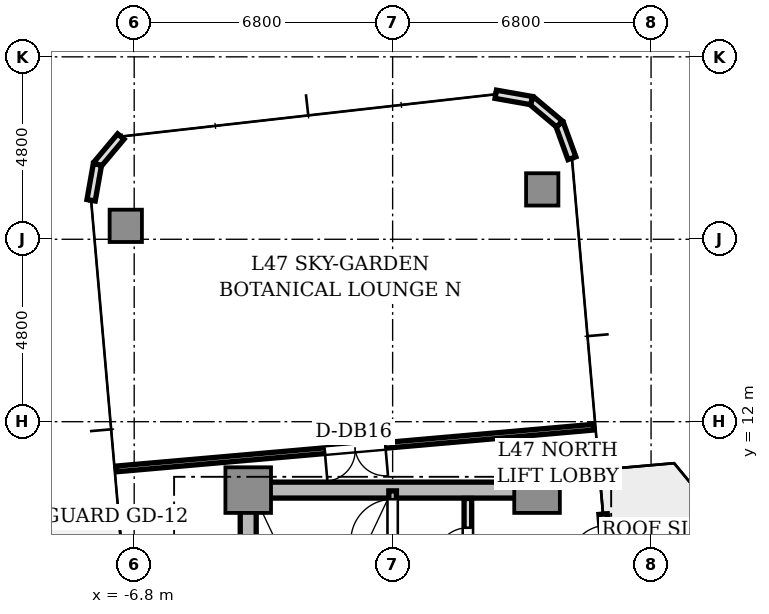
"""IFC4 building model, lengths in metres.
Left out: names, types, materials, properties, quantities, classifications, styles, units other than length and angle.
Written with IfcOpenShell. Run it as: python <this file> out.ifc"""

import sys

from ifc_helpers import new_model, si_unit, direction, frame, frame_2d, origin, origin_2d, place, context, subcontext, project, spatial, rectangle, extrude, source, transform, mapped, element, fill, save


model = new_model("IFC4")
c1 = context("Model", 3, precision=1e-05, world=origin(), true_north=direction((0.0, 1.0)))
c2 = subcontext(c1, "Body", "Model", "MODEL_VIEW")
j1 = project(units=[si_unit("LENGTHUNIT", "METRE"), si_unit("PLANEANGLEUNIT", "RADIAN")], contexts=[c1])
p1 = place(None, origin())
s1 = spatial("IfcSite", under=j1, at=p1, CompositionType="ELEMENT")
p2 = place(p1, origin())
s2 = spatial("IfcBuilding", under=s1, at=p2, CompositionType="ELEMENT")
p3 = place(p2, frame((0.0, 0.0, 170.7)))
s3 = spatial("IfcBuildingStorey", under=s2, at=p3, CompositionType="ELEMENT", Elevation=170.7)
p4 = place(p3, frame((-3.55, 10.2, 0.0), z_axis=(0.0, 0.0, 1.0), x_axis=(1.0, 0.0, 0.0)))
e1 = element("IfcWall", 1, at=p4, inside=s3, PredefinedType="SHEAR", context=c2, shape_type="SweptSolid", body=[
    extrude(rectangle(XDim=7.1, YDim=0.42, at=frame_2d((3.55, 0.0))), origin(), (0.0, 0.0, 1.0), 4.26),
])
p5 = place(p3, frame((-3.8, 2.85, 0.0), z_axis=(0.0, 0.0, 1.0), x_axis=(0.0, 1.0, 0.0)))
e2 = element("IfcWall", 2, at=p5, inside=s3, PredefinedType="SHEAR", context=c2, shape_type="SweptSolid", body=[
    extrude(rectangle(XDim=6.9, YDim=0.42, at=frame_2d((3.45, 0.0))), origin(), (0.0, 0.0, 1.0), 4.26),
])
m1 = source(origin(), c2, "Body", "SweptSolid", [
    extrude(rectangle(XDim=1.2, YDim=1.2, at=origin_2d()), origin(), (0.0, 0.0, 1.0), 4.26),
])
for number, where, z_axis, x_axis in (
    (3, (-3.8, 10.2, 0.0), (0.0, 0.0, 1.0), (1.0, 0.0, 0.0)),
    (4, (3.8, 10.2, 0.0), (0.0, 0.0, 1.0), (1.0, 0.0, 0.0)),
):
    element("IfcColumn", number, at=place(p3, frame(where, z_axis=z_axis, x_axis=x_axis)), inside=s3, PredefinedType="COLUMN", context=c2, shape_type="MappedRepresentation", body=[
        mapped(m1, transform((0.0, 0.0, 0.0), scale=1.0)),
    ])
m2 = source(origin(), c2, "Body", "SweptSolid", [
    extrude(rectangle(XDim=0.85, YDim=0.85, at=origin_2d()), origin(), (0.0, 0.0, 1.0), 4.26),
])
for number, where, z_axis, x_axis in (
    (5, (3.936, 18.112, 0.0), (0.0, 0.0, 1.0), (1.0, 0.0, 0.0)),
    (6, (-7.022, 17.153, 0.0), (0.0, 0.0, 1.0), (1.0, 0.0, 0.0)),
):
    element("IfcColumn", number, at=place(p3, frame(where, z_axis=z_axis, x_axis=x_axis)), inside=s3, PredefinedType="COLUMN", context=c2, shape_type="MappedRepresentation", body=[
        mapped(m2, transform((0.0, 0.0, 0.0), scale=1.0)),
    ])
p6 = place(p3, frame((5.772, 6.879, 0.0), z_axis=(0.0, 0.0, 1.0), x_axis=(-0.087168071984, 0.996193619346, 0.0)))
e7 = element("IfcWall", 7, at=p6, inside=s3, PredefinedType="STANDARD", context=c2, shape_type="SweptSolid", body=[
    extrude(rectangle(XDim=2.7, YDim=0.22, at=frame_2d((1.35, 0.0))), origin(), (0.0, 0.0, 1.0), 4.26),
])
p7 = place(p6, frame((1.4, 0.0, 0.0)))
e8 = element("IfcOpeningElement", 8, at=p7, cuts=e7, PredefinedType="OPENING", context=c2, shape_type="SweptSolid", body=[
    extrude(rectangle(XDim=1.0, YDim=2.2, at=frame_2d((0.5, 1.1))), frame((0.0, 0.12, 0.0), z_axis=(0.0, -1.0, 0.0), x_axis=(1.0, 0.0, 0.0)), (0.0, 0.0, 1.0), 0.24),
])
p8 = place(p3, frame((4.718, 18.933, 0.0), z_axis=(0.0, 0.0, 1.0), x_axis=(-0.34188635151, 0.939741306239, 0.0)))
e9 = element("IfcWall", 9, at=p8, inside=s3, PredefinedType="STANDARD", context=c2, shape_type="SweptSolid", body=[
    extrude(rectangle(XDim=0.958, YDim=0.22, at=frame_2d((0.479, 0.0))), origin(), (0.0, 0.0, 1.0), 4.26),
])
for number, where, z_axis, x_axis in (
    (10, (4.39, 19.833, 0.0), (0.0, 0.0, 1.0), (-0.766, 0.643, 0.0)),
    (11, (3.657, 20.449, 0.0), (0.0, 0.0, 1.0), (-0.985, 0.174, 0.0)),
):
    element("IfcWall", number, at=place(p3, frame(where, z_axis=z_axis, x_axis=x_axis)), inside=s3, PredefinedType="STANDARD", context=c2, shape_type="SweptSolid", body=[
        extrude(rectangle(XDim=0.958, YDim=0.22, at=frame_2d((0.479, 0.0))), origin(), (0.0, 0.0, 1.0), 4.26),
    ])
for number, where, z_axis, x_axis in (
    (12, (-7.152, 19.503, 0.0), (0.0, 0.0, 1.0), (-0.643, -0.766, 0.0)),
    (13, (-7.768, 18.769, 0.0), (0.0, 0.0, 1.0), (-0.174, -0.985, 0.0)),
):
    element("IfcWall", number, at=place(p3, frame(where, z_axis=z_axis, x_axis=x_axis)), inside=s3, PredefinedType="STANDARD", context=c2, shape_type="SweptSolid", body=[
        extrude(rectangle(XDim=0.958, YDim=0.22, at=frame_2d((0.479, 0.0))), origin(), (0.0, 0.0, 1.0), 4.26),
    ])
p9 = place(p3, frame((0.0, 2.5, 0.0), z_axis=(0.0, 0.0, 1.0), x_axis=(0.0, 1.0, 0.0)))
e14 = element("IfcWall", 14, at=p9, inside=s3, PredefinedType="SOLIDWALL", context=c2, shape_type="SweptSolid", body=[
    extrude(rectangle(XDim=7.68, YDim=0.2, at=frame_2d((3.84, 0.0))), origin(), (0.0, 0.0, 1.0), 4.26),
])
p10 = place(p9, frame((6.36, 0.0, 0.0)))
e15 = element("IfcOpeningElement", 15, at=p10, cuts=e14, PredefinedType="OPENING", context=c2, shape_type="SweptSolid", body=[
    extrude(rectangle(XDim=1.1, YDim=2.15, at=frame_2d((0.55, 1.075))), frame((0.0, 0.11, 0.0), z_axis=(0.0, -1.0, 0.0), x_axis=(1.0, 0.0, 0.0)), (0.0, 0.0, 1.0), 0.22),
])
p11 = place(p3, frame((1.98, 5.32, 0.0), z_axis=(0.0, 0.0, 1.0), x_axis=(0.0, 1.0, 0.0)))
e16 = element("IfcWall", 16, at=p11, inside=s3, PredefinedType="SOLIDWALL", context=c2, shape_type="SweptSolid", body=[
    extrude(rectangle(XDim=4.66, YDim=0.2, at=frame_2d((2.33, 0.0))), origin(), (0.0, 0.0, 1.0), 3.81),
])
p12 = place(p11, frame((3.04, 0.0, 0.0)))
e17 = element("IfcOpeningElement", 17, at=p12, cuts=e16, PredefinedType="OPENING", context=c2, shape_type="SweptSolid", body=[
    extrude(rectangle(XDim=0.85, YDim=2.1, at=frame_2d((0.425, 1.05))), frame((0.0, 0.11, 0.0), z_axis=(0.0, -1.0, 0.0), x_axis=(1.0, 0.0, 0.0)), (0.0, 0.0, 1.0), 0.22),
])
p13 = place(p3, frame((5.287, 11.856, 0.0), z_axis=(0.0, 0.0, 1.0), x_axis=(-0.996194790044, -0.087154691724, 0.0)))
e18 = element("IfcWall", 18, at=p13, inside=s3, PredefinedType="PARTITIONING", context=c2, shape_type="SweptSolid", body=[
    extrude(rectangle(XDim=12.6, YDim=0.15, at=frame_2d((6.3, 0.0))), origin(), (0.0, 0.0, 1.0), 3.81),
])
p14 = place(p13, frame((5.5, 0.0, 0.0)))
e19 = element("IfcOpeningElement", 19, at=p14, cuts=e18, PredefinedType="OPENING", context=c2, shape_type="SweptSolid", body=[
    extrude(rectangle(XDim=1.6, YDim=2.25, at=frame_2d((0.8, 1.125))), frame((0.0, 0.085, 0.0), z_axis=(0.0, -1.0, 0.0), x_axis=(1.0, 0.0, 0.0)), (0.0, 0.0, 1.0), 0.17),
])
m3 = source(origin(), c2, "Body", "SweptSolid", [
    extrude(rectangle(XDim=1.0, YDim=0.05, at=origin_2d()), origin(), (0.0, 0.0, 1.0), 2.2),
])
p15 = place(p7, frame((0.5, 0.0, 0.0)))
e20 = element("IfcDoor", 20, at=p15, inside=s3, OperationType="SINGLE_SWING_LEFT", PredefinedType="DOOR", context=c2, shape_type="MappedRepresentation", body=[
    mapped(m3, transform((0.0, 0.0, 0.0), scale=1.0)),
])
fill(e8, e20)
m4 = source(origin(), c2, "Body", "SweptSolid", [
    extrude(rectangle(XDim=1.1, YDim=0.05, at=origin_2d()), origin(), (0.0, 0.0, 1.0), 2.15),
])
p16 = place(p10, frame((0.55, 0.0, 0.0)))
e21 = element("IfcDoor", 21, at=p16, inside=s3, OperationType="SINGLE_SWING_LEFT", PredefinedType="DOOR", context=c2, shape_type="MappedRepresentation", body=[
    mapped(m4, transform((0.0, 0.0, 0.0), scale=1.0)),
])
fill(e15, e21)
m5 = source(origin(), c2, "Body", "SweptSolid", [
    extrude(rectangle(XDim=0.85, YDim=0.05, at=origin_2d()), origin(), (0.0, 0.0, 1.0), 2.1),
])
p17 = place(p12, frame((0.425, 0.0, 0.0)))
e22 = element("IfcDoor", 22, at=p17, inside=s3, OperationType="SINGLE_SWING_LEFT", PredefinedType="DOOR", context=c2, shape_type="MappedRepresentation", body=[
    mapped(m5, transform((0.0, 0.0, 0.0), scale=1.0)),
])
fill(e17, e22)
m6 = source(origin(), c2, "Body", "SweptSolid", [
    extrude(rectangle(XDim=1.6, YDim=0.05, at=origin_2d()), origin(), (0.0, 0.0, 1.0), 2.25),
])
p18 = place(p14, frame((0.8, 0.0, 0.0)))
e23 = element("IfcDoor", 23, at=p18, inside=s3, OperationType="DOUBLE_DOOR_SINGLE_SWING", PredefinedType="DOOR", context=c2, shape_type="MappedRepresentation", body=[
    mapped(m6, transform((0.0, 0.0, 0.0), scale=1.0)),
])
fill(e19, e23)
save(model, sys.argv[1])
